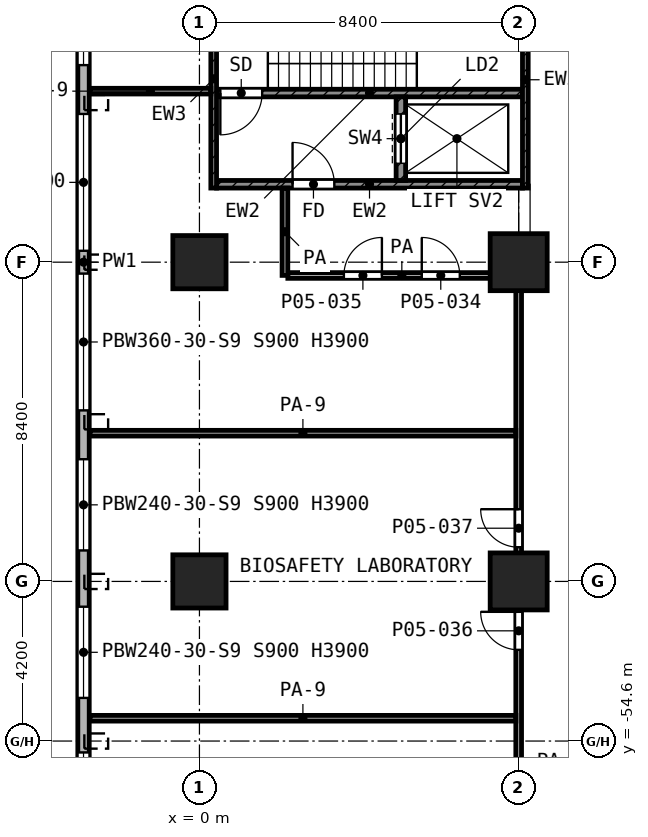
"""IFC4 building model, lengths in metres.
Left out: names, types, materials, properties, quantities, classifications, styles, units other than length and angle.
Written with IfcOpenShell. Run it as: python <this file> out.ifc"""

import sys

from ifc_helpers import new_model, si_unit, direction, frame, frame_2d, origin, origin_2d, place, context, subcontext, project, spatial, rectangle, extrude, element, fill, save


model = new_model("IFC4")
c1 = context("Model", 3, precision=1e-05, world=origin(), true_north=direction((0.0, 1.0)))
c2 = subcontext(c1, "Body", "Model", "MODEL_VIEW")
j1 = project(units=[si_unit("LENGTHUNIT", "METRE"), si_unit("PLANEANGLEUNIT", "RADIAN")], contexts=[c1])
p1 = place(None, origin())
s1 = spatial("IfcSite", under=j1, at=p1, CompositionType="ELEMENT")
p2 = place(p1, origin())
s2 = spatial("IfcBuilding", under=s1, at=p2, CompositionType="ELEMENT")
p3 = place(p2, frame((0.0, 0.0, 23.8)))
s3 = spatial("IfcBuildingStorey", under=s2, at=p3, CompositionType="ELEMENT", Elevation=23.8)
p4 = place(p3, frame((0.0, -42.0, 0.0), z_axis=(0.0, 0.0, 1.0), x_axis=(1.0, 0.0, 0.0)))
e1 = element("IfcColumn", 1, at=p4, inside=s3, PredefinedType="COLUMN", context=c2, shape_type="SweptSolid", body=[
    extrude(rectangle(XDim=1.4, YDim=1.4, at=origin_2d()), origin(), (0.0, 0.0, 1.0), 5.2),
])
p5 = place(p3, frame((8.4, -42.0, 0.0), z_axis=(0.0, 0.0, 1.0), x_axis=(1.0, 0.0, 0.0)))
e2 = element("IfcColumn", 2, at=p5, inside=s3, PredefinedType="COLUMN", context=c2, shape_type="SweptSolid", body=[
    extrude(rectangle(XDim=1.5, YDim=1.5, at=origin_2d()), origin(), (0.0, 0.0, 1.0), 5.2),
])
p6 = place(p3, frame((0.0, -50.4, 0.0), z_axis=(0.0, 0.0, 1.0), x_axis=(1.0, 0.0, 0.0)))
e3 = element("IfcColumn", 3, at=p6, inside=s3, PredefinedType="COLUMN", context=c2, shape_type="SweptSolid", body=[
    extrude(rectangle(XDim=1.4, YDim=1.4, at=origin_2d()), origin(), (0.0, 0.0, 1.0), 5.2),
])
p7 = place(p3, frame((8.4, -50.4, 0.0), z_axis=(0.0, 0.0, 1.0), x_axis=(1.0, 0.0, 0.0)))
e4 = element("IfcColumn", 4, at=p7, inside=s3, PredefinedType="COLUMN", context=c2, shape_type="SweptSolid", body=[
    extrude(rectangle(XDim=1.5, YDim=1.5, at=origin_2d()), origin(), (0.0, 0.0, 1.0), 5.2),
])
p8 = place(p3, frame((-3.05, -2.862, 0.0), z_axis=(0.0, 0.0, 1.0), x_axis=(0.0, -1.0, 0.0)))
e5 = element("IfcWall", 5, at=p8, inside=s3, PredefinedType="SOLIDWALL", context=c2, shape_type="SweptSolid", body=[
    extrude(rectangle(XDim=78.276, YDim=0.3, at=frame_2d((39.138, 0.0))), origin(), (0.0, 0.0, 1.0), 4.85),
])
p9 = place(p8, frame((1.638, 0.0, 0.9)))
e6 = element("IfcOpeningElement", 6, at=p9, cuts=e5, PredefinedType="OPENING", context=c2, shape_type="SweptSolid", body=[
    extrude(rectangle(XDim=3.6, YDim=3.0, at=frame_2d((1.8, 1.5))), frame((0.0, 0.16, 0.0), z_axis=(0.0, -1.0, 0.0), x_axis=(1.0, 0.0, 0.0)), (0.0, 0.0, 1.0), 0.32),
])
p10 = place(p8, frame((5.838, 0.0, 0.9)))
e7 = element("IfcOpeningElement", 7, at=p10, cuts=e5, PredefinedType="OPENING", context=c2, shape_type="SweptSolid", body=[
    extrude(rectangle(XDim=3.6, YDim=3.0, at=frame_2d((1.8, 1.5))), frame((0.0, 0.16, 0.0), z_axis=(0.0, -1.0, 0.0), x_axis=(1.0, 0.0, 0.0)), (0.0, 0.0, 1.0), 0.32),
])
p11 = place(p8, frame((10.038, 0.0, 0.9)))
e8 = element("IfcOpeningElement", 8, at=p11, cuts=e5, PredefinedType="OPENING", context=c2, shape_type="SweptSolid", body=[
    extrude(rectangle(XDim=3.6, YDim=3.0, at=frame_2d((1.8, 1.5))), frame((0.0, 0.16, 0.0), z_axis=(0.0, -1.0, 0.0), x_axis=(1.0, 0.0, 0.0)), (0.0, 0.0, 1.0), 0.32),
])
p12 = place(p8, frame((14.238, 0.0, 0.9)))
e9 = element("IfcOpeningElement", 9, at=p12, cuts=e5, PredefinedType="OPENING", context=c2, shape_type="SweptSolid", body=[
    extrude(rectangle(XDim=3.6, YDim=3.0, at=frame_2d((1.8, 1.5))), frame((0.0, 0.16, 0.0), z_axis=(0.0, -1.0, 0.0), x_axis=(1.0, 0.0, 0.0)), (0.0, 0.0, 1.0), 0.32),
])
p13 = place(p8, frame((18.438, 0.0, 0.9)))
e10 = element("IfcOpeningElement", 10, at=p13, cuts=e5, PredefinedType="OPENING", context=c2, shape_type="SweptSolid", body=[
    extrude(rectangle(XDim=3.6, YDim=3.0, at=frame_2d((1.8, 1.5))), frame((0.0, 0.16, 0.0), z_axis=(0.0, -1.0, 0.0), x_axis=(1.0, 0.0, 0.0)), (0.0, 0.0, 1.0), 0.32),
])
p14 = place(p8, frame((22.638, 0.0, 0.9)))
e11 = element("IfcOpeningElement", 11, at=p14, cuts=e5, PredefinedType="OPENING", context=c2, shape_type="SweptSolid", body=[
    extrude(rectangle(XDim=3.6, YDim=3.0, at=frame_2d((1.8, 1.5))), frame((0.0, 0.16, 0.0), z_axis=(0.0, -1.0, 0.0), x_axis=(1.0, 0.0, 0.0)), (0.0, 0.0, 1.0), 0.32),
])
p15 = place(p8, frame((27.653, 0.0, 0.9)))
e12 = element("IfcOpeningElement", 12, at=p15, cuts=e5, PredefinedType="OPENING", context=c2, shape_type="SweptSolid", body=[
    extrude(rectangle(XDim=2.4, YDim=3.0, at=frame_2d((1.2, 1.5))), frame((0.0, 0.16, 0.0), z_axis=(0.0, -1.0, 0.0), x_axis=(1.0, 0.0, 0.0)), (0.0, 0.0, 1.0), 0.32),
])
p16 = place(p8, frame((31.553, 0.0, 0.9)))
e13 = element("IfcOpeningElement", 13, at=p16, cuts=e5, PredefinedType="OPENING", context=c2, shape_type="SweptSolid", body=[
    extrude(rectangle(XDim=2.4, YDim=3.0, at=frame_2d((1.2, 1.5))), frame((0.0, 0.16, 0.0), z_axis=(0.0, -1.0, 0.0), x_axis=(1.0, 0.0, 0.0)), (0.0, 0.0, 1.0), 0.32),
])
p17 = place(p8, frame((35.238, 0.0, 0.9)))
e14 = element("IfcOpeningElement", 14, at=p17, cuts=e5, PredefinedType="OPENING", context=c2, shape_type="SweptSolid", body=[
    extrude(rectangle(XDim=3.6, YDim=3.0, at=frame_2d((1.8, 1.5))), frame((0.0, 0.16, 0.0), z_axis=(0.0, -1.0, 0.0), x_axis=(1.0, 0.0, 0.0)), (0.0, 0.0, 1.0), 0.32),
])
p18 = place(p8, frame((39.438, 0.0, 0.9)))
e15 = element("IfcOpeningElement", 15, at=p18, cuts=e5, PredefinedType="OPENING", context=c2, shape_type="SweptSolid", body=[
    extrude(rectangle(XDim=3.6, YDim=3.0, at=frame_2d((1.8, 1.5))), frame((0.0, 0.16, 0.0), z_axis=(0.0, -1.0, 0.0), x_axis=(1.0, 0.0, 0.0)), (0.0, 0.0, 1.0), 0.32),
])
p19 = place(p8, frame((44.323, 0.0, 0.9)))
e16 = element("IfcOpeningElement", 16, at=p19, cuts=e5, PredefinedType="OPENING", context=c2, shape_type="SweptSolid", body=[
    extrude(rectangle(XDim=2.4, YDim=3.0, at=frame_2d((1.2, 1.5))), frame((0.0, 0.16, 0.0), z_axis=(0.0, -1.0, 0.0), x_axis=(1.0, 0.0, 0.0)), (0.0, 0.0, 1.0), 0.32),
])
p20 = place(p8, frame((48.203, 0.0, 0.9)))
e17 = element("IfcOpeningElement", 17, at=p20, cuts=e5, PredefinedType="OPENING", context=c2, shape_type="SweptSolid", body=[
    extrude(rectangle(XDim=2.4, YDim=3.0, at=frame_2d((1.2, 1.5))), frame((0.0, 0.16, 0.0), z_axis=(0.0, -1.0, 0.0), x_axis=(1.0, 0.0, 0.0)), (0.0, 0.0, 1.0), 0.32),
])
p21 = place(p8, frame((52.038, 0.0, 0.9)))
e18 = element("IfcOpeningElement", 18, at=p21, cuts=e5, PredefinedType="OPENING", context=c2, shape_type="SweptSolid", body=[
    extrude(rectangle(XDim=3.6, YDim=3.0, at=frame_2d((1.8, 1.5))), frame((0.0, 0.16, 0.0), z_axis=(0.0, -1.0, 0.0), x_axis=(1.0, 0.0, 0.0)), (0.0, 0.0, 1.0), 0.32),
])
p22 = place(p8, frame((56.238, 0.0, 0.9)))
e19 = element("IfcOpeningElement", 19, at=p22, cuts=e5, PredefinedType="OPENING", context=c2, shape_type="SweptSolid", body=[
    extrude(rectangle(XDim=3.6, YDim=3.0, at=frame_2d((1.8, 1.5))), frame((0.0, 0.16, 0.0), z_axis=(0.0, -1.0, 0.0), x_axis=(1.0, 0.0, 0.0)), (0.0, 0.0, 1.0), 0.32),
])
p23 = place(p8, frame((60.438, 0.0, 0.9)))
e20 = element("IfcOpeningElement", 20, at=p23, cuts=e5, PredefinedType="OPENING", context=c2, shape_type="SweptSolid", body=[
    extrude(rectangle(XDim=3.6, YDim=3.0, at=frame_2d((1.8, 1.5))), frame((0.0, 0.16, 0.0), z_axis=(0.0, -1.0, 0.0), x_axis=(1.0, 0.0, 0.0)), (0.0, 0.0, 1.0), 0.32),
])
p24 = place(p8, frame((64.638, 0.0, 0.9)))
e21 = element("IfcOpeningElement", 21, at=p24, cuts=e5, PredefinedType="OPENING", context=c2, shape_type="SweptSolid", body=[
    extrude(rectangle(XDim=3.6, YDim=3.0, at=frame_2d((1.8, 1.5))), frame((0.0, 0.16, 0.0), z_axis=(0.0, -1.0, 0.0), x_axis=(1.0, 0.0, 0.0)), (0.0, 0.0, 1.0), 0.32),
])
p25 = place(p8, frame((69.238, 0.0, 0.9)))
e22 = element("IfcOpeningElement", 22, at=p25, cuts=e5, PredefinedType="OPENING", context=c2, shape_type="SweptSolid", body=[
    extrude(rectangle(XDim=1.2, YDim=3.0, at=frame_2d((0.6, 1.5))), frame((0.0, 0.16, 0.0), z_axis=(0.0, -1.0, 0.0), x_axis=(1.0, 0.0, 0.0)), (0.0, 0.0, 1.0), 0.32),
])
p26 = place(p8, frame((73.038, 0.0, 0.9)))
e23 = element("IfcOpeningElement", 23, at=p26, cuts=e5, PredefinedType="OPENING", context=c2, shape_type="SweptSolid", body=[
    extrude(rectangle(XDim=3.6, YDim=3.0, at=frame_2d((1.8, 1.5))), frame((0.0, 0.16, 0.0), z_axis=(0.0, -1.0, 0.0), x_axis=(1.0, 0.0, 0.0)), (0.0, 0.0, 1.0), 0.32),
])
p27 = place(p3, frame((0.375, -40.05, 0.0), z_axis=(0.0, 0.0, 1.0), x_axis=(0.0, 1.0, 0.0)))
e24 = element("IfcWall", 24, at=p27, inside=s3, PredefinedType="SHEAR", context=c2, shape_type="SweptSolid", body=[
    extrude(rectangle(XDim=5.75, YDim=0.15, at=frame_2d((2.875, 0.0))), origin(), (0.0, 0.0, 1.0), 4.85),
])
p28 = place(p3, frame((8.575, -40.05, 0.0), z_axis=(0.0, 0.0, 1.0), x_axis=(0.0, 1.0, 0.0)))
e25 = element("IfcWall", 25, at=p28, inside=s3, PredefinedType="SHEAR", context=c2, shape_type="SweptSolid", body=[
    extrude(rectangle(XDim=5.7, YDim=0.15, at=frame_2d((2.85, 0.0))), origin(), (0.0, 0.0, 1.0), 4.85),
])
p29 = place(p3, frame((0.45, -37.55, 0.0), z_axis=(0.0, 0.0, 1.0), x_axis=(1.0, 0.0, 0.0)))
e26 = element("IfcWall", 26, at=p29, inside=s3, PredefinedType="SHEAR", context=c2, shape_type="SweptSolid", body=[
    extrude(rectangle(XDim=8.05, YDim=0.2, at=frame_2d((4.025, 0.0))), origin(), (0.0, 0.0, 1.0), 4.85),
])
p30 = place(p29, frame((0.1, 0.0, 0.0)))
e27 = element("IfcOpeningElement", 27, at=p30, cuts=e26, PredefinedType="OPENING", context=c2, shape_type="SweptSolid", body=[
    extrude(rectangle(XDim=1.1, YDim=2.1, at=frame_2d((0.55, 1.05))), frame((0.0, 0.11, 0.0), z_axis=(0.0, -1.0, 0.0), x_axis=(1.0, 0.0, 0.0)), (0.0, 0.0, 1.0), 0.22),
])
p31 = place(p3, frame((0.45, -39.95, 0.0), z_axis=(0.0, 0.0, 1.0), x_axis=(1.0, 0.0, 0.0)))
e28 = element("IfcWall", 28, at=p31, inside=s3, PredefinedType="SHEAR", context=c2, shape_type="SweptSolid", body=[
    extrude(rectangle(XDim=8.05, YDim=0.2, at=frame_2d((4.025, 0.0))), origin(), (0.0, 0.0, 1.0), 4.85),
])
p32 = place(p31, frame((2.0, 0.0, 0.0)))
e29 = element("IfcOpeningElement", 29, at=p32, cuts=e28, PredefinedType="OPENING", context=c2, shape_type="SweptSolid", body=[
    extrude(rectangle(XDim=1.1, YDim=2.1, at=frame_2d((0.55, 1.05))), frame((0.0, 0.11, 0.0), z_axis=(0.0, -1.0, 0.0), x_axis=(1.0, 0.0, 0.0)), (0.0, 0.0, 1.0), 0.22),
])
p33 = place(p3, frame((5.3, -39.85, 0.0), z_axis=(0.0, 0.0, 1.0), x_axis=(0.0, 1.0, 0.0)))
e30 = element("IfcWall", 30, at=p33, inside=s3, PredefinedType="SHEAR", context=c2, shape_type="SweptSolid", body=[
    extrude(rectangle(XDim=2.2, YDim=0.25, at=frame_2d((1.1, 0.0))), origin(), (0.0, 0.0, 1.0), 4.85),
])
p34 = place(p33, frame((0.45, 0.0, 0.0)))
e31 = element("IfcOpeningElement", 31, at=p34, cuts=e30, PredefinedType="OPENING", context=c2, shape_type="SweptSolid", body=[
    extrude(rectangle(XDim=1.3, YDim=2.1, at=frame_2d((0.65, 1.05))), frame((0.0, 0.135, 0.0), z_axis=(0.0, -1.0, 0.0), x_axis=(1.0, 0.0, 0.0)), (0.0, 0.0, 1.0), 0.27),
])
for number, where, z_axis, x_axis in (
    (32, (-2.88, -54.0, 0.0), (0.0, 0.0, 1.0), (1.0, 0.0, 0.0)),
    (33, (-2.88, -46.5, 0.0), (0.0, 0.0, 1.0), (1.0, 0.0, 0.0)),
):
    element("IfcWall", number, at=place(p3, frame(where, z_axis=z_axis, x_axis=x_axis)), inside=s3, PredefinedType="PARTITIONING", context=c2, shape_type="SweptSolid", body=[
        extrude(rectangle(XDim=11.205, YDim=0.15, at=frame_2d((5.603, 0.0))), origin(), (0.0, 0.0, 1.0), 3.45),
    ])
p35 = place(p3, frame((2.326, -42.35, 0.0), z_axis=(0.0, 0.0, 1.0), x_axis=(1.0, 0.0, 0.0)))
e34 = element("IfcWall", 34, at=p35, inside=s3, PredefinedType="PARTITIONING", context=c2, shape_type="SweptSolid", body=[
    extrude(rectangle(XDim=5.999, YDim=0.15, at=frame_2d((3.0, 0.0))), origin(), (0.0, 0.0, 1.0), 4.85),
])
p36 = place(p35, frame((3.524, 0.0, 0.0)))
e35 = element("IfcOpeningElement", 35, at=p36, cuts=e34, PredefinedType="OPENING", context=c2, shape_type="SweptSolid", body=[
    extrude(rectangle(XDim=1.0, YDim=2.1, at=frame_2d((0.5, 1.05))), frame((0.0, 0.085, 0.0), z_axis=(0.0, -1.0, 0.0), x_axis=(1.0, 0.0, 0.0)), (0.0, 0.0, 1.0), 0.17),
])
p37 = place(p35, frame((1.475, 0.0, 0.0)))
e36 = element("IfcOpeningElement", 36, at=p37, cuts=e34, PredefinedType="OPENING", context=c2, shape_type="SweptSolid", body=[
    extrude(rectangle(XDim=1.0, YDim=2.1, at=frame_2d((0.5, 1.05))), frame((0.0, 0.085, 0.0), z_axis=(0.0, -1.0, 0.0), x_axis=(1.0, 0.0, 0.0)), (0.0, 0.0, 1.0), 0.17),
])
p38 = place(p3, frame((-2.88, -37.5, 0.0), z_axis=(0.0, 0.0, 1.0), x_axis=(1.0, 0.0, 0.0)))
e37 = element("IfcWall", 37, at=p38, inside=s3, PredefinedType="PARTITIONING", context=c2, shape_type="SweptSolid", body=[
    extrude(rectangle(XDim=3.18, YDim=0.15, at=frame_2d((1.59, 0.0))), origin(), (0.0, 0.0, 1.0), 3.45),
])
p39 = place(p3, frame((2.25, -42.348, 0.0), z_axis=(0.0, 0.0, 1.0), x_axis=(0.0, 1.0, 0.0)))
e38 = element("IfcWall", 38, at=p39, inside=s3, PredefinedType="PARTITIONING", context=c2, shape_type="SweptSolid", body=[
    extrude(rectangle(XDim=2.298, YDim=0.15, at=frame_2d((1.149, 0.0))), origin(), (0.0, 0.0, 1.0), 4.85),
])
p40 = place(p3, frame((8.4, -67.947, 0.0), z_axis=(0.0, 0.0, 1.0), x_axis=(0.0, 1.0, 0.0)))
e39 = element("IfcWall", 39, at=p40, inside=s3, PredefinedType="PARTITIONING", context=c2, shape_type="SweptSolid", body=[
    extrude(rectangle(XDim=25.597, YDim=0.15, at=frame_2d((12.798, 0.0))), origin(), (0.0, 0.0, 1.0), 4.85),
])
p41 = place(p40, frame((15.747, 0.0, 0.0)))
e40 = element("IfcOpeningElement", 40, at=p41, cuts=e39, PredefinedType="OPENING", context=c2, shape_type="SweptSolid", body=[
    extrude(rectangle(XDim=1.0, YDim=2.1, at=frame_2d((0.5, 1.05))), frame((0.0, 0.085, 0.0), z_axis=(0.0, -1.0, 0.0), x_axis=(1.0, 0.0, 0.0)), (0.0, 0.0, 1.0), 0.17),
])
p42 = place(p40, frame((18.447, 0.0, 0.0)))
e41 = element("IfcOpeningElement", 41, at=p42, cuts=e39, PredefinedType="OPENING", context=c2, shape_type="SweptSolid", body=[
    extrude(rectangle(XDim=1.0, YDim=2.1, at=frame_2d((0.5, 1.05))), frame((0.0, 0.085, 0.0), z_axis=(0.0, -1.0, 0.0), x_axis=(1.0, 0.0, 0.0)), (0.0, 0.0, 1.0), 0.17),
])
p43 = place(p40, frame((7.347, 0.0, 0.0)))
e42 = element("IfcOpeningElement", 42, at=p43, cuts=e39, PredefinedType="OPENING", context=c2, shape_type="SweptSolid", body=[
    extrude(rectangle(XDim=1.0, YDim=2.1, at=frame_2d((0.5, 1.05))), frame((0.0, 0.085, 0.0), z_axis=(0.0, -1.0, 0.0), x_axis=(1.0, 0.0, 0.0)), (0.0, 0.0, 1.0), 0.17),
])
p44 = place(p40, frame((10.447, 0.0, 0.0)))
e43 = element("IfcOpeningElement", 43, at=p44, cuts=e39, PredefinedType="OPENING", context=c2, shape_type="SweptSolid", body=[
    extrude(rectangle(XDim=1.0, YDim=2.1, at=frame_2d((0.5, 1.05))), frame((0.0, 0.085, 0.0), z_axis=(0.0, -1.0, 0.0), x_axis=(1.0, 0.0, 0.0)), (0.0, 0.0, 1.0), 0.17),
])
p45 = place(p40, frame((1.549, 0.0, 0.0)))
e44 = element("IfcOpeningElement", 44, at=p45, cuts=e39, PredefinedType="OPENING", context=c2, shape_type="SweptSolid", body=[
    extrude(rectangle(XDim=1.0, YDim=2.1, at=frame_2d((0.5, 1.05))), frame((0.0, 0.085, 0.0), z_axis=(0.0, -1.0, 0.0), x_axis=(1.0, 0.0, 0.0)), (0.0, 0.0, 1.0), 0.17),
])
p46 = place(p40, frame((2.898, 0.0, 0.0)))
e45 = element("IfcOpeningElement", 45, at=p46, cuts=e39, PredefinedType="OPENING", context=c2, shape_type="SweptSolid", body=[
    extrude(rectangle(XDim=1.0, YDim=2.1, at=frame_2d((0.5, 1.05))), frame((0.0, 0.085, 0.0), z_axis=(0.0, -1.0, 0.0), x_axis=(1.0, 0.0, 0.0)), (0.0, 0.0, 1.0), 0.17),
])
p47 = place(p16, origin())
e46 = element("IfcWindow", 46, at=p47, inside=s3, PartitioningType="SINGLE_PANEL", PredefinedType="WINDOW", context=c2, shape_type="SweptSolid", body=[
    extrude(rectangle(XDim=2.4, YDim=3.0, at=frame_2d((1.2, 1.5))), frame((0.0, 0.03, 0.0), z_axis=(0.0, -1.0, 0.0), x_axis=(1.0, 0.0, 0.0)), (0.0, 0.0, 1.0), 0.06),
])
fill(e13, e46)
p48 = place(p17, origin())
e47 = element("IfcWindow", 47, at=p48, inside=s3, PartitioningType="SINGLE_PANEL", PredefinedType="WINDOW", context=c2, shape_type="SweptSolid", body=[
    extrude(rectangle(XDim=3.6, YDim=3.0, at=frame_2d((1.8, 1.5))), frame((0.0, 0.03, 0.0), z_axis=(0.0, -1.0, 0.0), x_axis=(1.0, 0.0, 0.0)), (0.0, 0.0, 1.0), 0.06),
])
fill(e14, e47)
p49 = place(p18, origin())
e48 = element("IfcWindow", 48, at=p49, inside=s3, PartitioningType="SINGLE_PANEL", PredefinedType="WINDOW", context=c2, shape_type="SweptSolid", body=[
    extrude(rectangle(XDim=3.6, YDim=3.0, at=frame_2d((1.8, 1.5))), frame((0.0, 0.03, 0.0), z_axis=(0.0, -1.0, 0.0), x_axis=(1.0, 0.0, 0.0)), (0.0, 0.0, 1.0), 0.06),
])
fill(e15, e48)
p50 = place(p19, origin())
e49 = element("IfcWindow", 49, at=p50, inside=s3, PartitioningType="SINGLE_PANEL", PredefinedType="WINDOW", context=c2, shape_type="SweptSolid", body=[
    extrude(rectangle(XDim=2.4, YDim=3.0, at=frame_2d((1.2, 1.5))), frame((0.0, 0.03, 0.0), z_axis=(0.0, -1.0, 0.0), x_axis=(1.0, 0.0, 0.0)), (0.0, 0.0, 1.0), 0.06),
])
fill(e16, e49)
p51 = place(p20, origin())
e50 = element("IfcWindow", 50, at=p51, inside=s3, PartitioningType="SINGLE_PANEL", PredefinedType="WINDOW", context=c2, shape_type="SweptSolid", body=[
    extrude(rectangle(XDim=2.4, YDim=3.0, at=frame_2d((1.2, 1.5))), frame((0.0, 0.03, 0.0), z_axis=(0.0, -1.0, 0.0), x_axis=(1.0, 0.0, 0.0)), (0.0, 0.0, 1.0), 0.06),
])
fill(e17, e50)
p52 = place(p21, origin())
e51 = element("IfcWindow", 51, at=p52, inside=s3, PartitioningType="SINGLE_PANEL", PredefinedType="WINDOW", context=c2, shape_type="SweptSolid", body=[
    extrude(rectangle(XDim=3.6, YDim=3.0, at=frame_2d((1.8, 1.5))), frame((0.0, 0.03, 0.0), z_axis=(0.0, -1.0, 0.0), x_axis=(1.0, 0.0, 0.0)), (0.0, 0.0, 1.0), 0.06),
])
fill(e18, e51)
p53 = place(p30, frame((1.1, 0.0, 0.0), z_axis=(0.0, 0.0, 1.0), x_axis=(-1.0, 0.0, 0.0)))
e52 = element("IfcDoor", 52, at=p53, inside=s3, OperationType="SINGLE_SWING_LEFT", PredefinedType="DOOR", context=c2, shape_type="SweptSolid", body=[
    extrude(rectangle(XDim=1.1, YDim=2.1, at=frame_2d((0.55, 1.05))), frame((0.0, 0.025, 0.0), z_axis=(0.0, -1.0, 0.0), x_axis=(1.0, 0.0, 0.0)), (0.0, 0.0, 1.0), 0.05),
])
fill(e27, e52)
p54 = place(p34, origin())
e53 = element("IfcDoor", 53, at=p54, inside=s3, OperationType="DOUBLE_DOOR_SLIDING", PredefinedType="DOOR", context=c2, shape_type="SweptSolid", body=[
    extrude(rectangle(XDim=1.3, YDim=2.1, at=frame_2d((0.65, 1.05))), frame((0.0, 0.025, 0.0), z_axis=(0.0, -1.0, 0.0), x_axis=(1.0, 0.0, 0.0)), (0.0, 0.0, 1.0), 0.05),
])
fill(e31, e53)
p55 = place(p32, origin())
e54 = element("IfcDoor", 54, at=p55, inside=s3, OperationType="SINGLE_SWING_LEFT", PredefinedType="DOOR", context=c2, shape_type="SweptSolid", body=[
    extrude(rectangle(XDim=1.1, YDim=2.1, at=frame_2d((0.55, 1.05))), frame((0.0, 0.025, 0.0), z_axis=(0.0, -1.0, 0.0), x_axis=(1.0, 0.0, 0.0)), (0.0, 0.0, 1.0), 0.05),
])
fill(e29, e54)
p56 = place(p36, origin())
e55 = element("IfcDoor", 55, at=p56, inside=s3, OperationType="SINGLE_SWING_LEFT", PredefinedType="DOOR", context=c2, shape_type="SweptSolid", body=[
    extrude(rectangle(XDim=1.0, YDim=2.1, at=frame_2d((0.5, 1.05))), frame((0.0, 0.025, 0.0), z_axis=(0.0, -1.0, 0.0), x_axis=(1.0, 0.0, 0.0)), (0.0, 0.0, 1.0), 0.05),
])
fill(e35, e55)
p57 = place(p37, origin())
e56 = element("IfcDoor", 56, at=p57, inside=s3, OperationType="SINGLE_SWING_RIGHT", PredefinedType="DOOR", context=c2, shape_type="SweptSolid", body=[
    extrude(rectangle(XDim=1.0, YDim=2.1, at=frame_2d((0.5, 1.05))), frame((0.0, 0.025, 0.0), z_axis=(0.0, -1.0, 0.0), x_axis=(1.0, 0.0, 0.0)), (0.0, 0.0, 1.0), 0.05),
])
fill(e36, e56)
p58 = place(p41, origin())
e57 = element("IfcDoor", 57, at=p58, inside=s3, OperationType="SINGLE_SWING_RIGHT", PredefinedType="DOOR", context=c2, shape_type="SweptSolid", body=[
    extrude(rectangle(XDim=1.0, YDim=2.1, at=frame_2d((0.5, 1.05))), frame((0.0, 0.025, 0.0), z_axis=(0.0, -1.0, 0.0), x_axis=(1.0, 0.0, 0.0)), (0.0, 0.0, 1.0), 0.05),
])
fill(e40, e57)
p59 = place(p42, origin())
e58 = element("IfcDoor", 58, at=p59, inside=s3, OperationType="SINGLE_SWING_RIGHT", PredefinedType="DOOR", context=c2, shape_type="SweptSolid", body=[
    extrude(rectangle(XDim=1.0, YDim=2.1, at=frame_2d((0.5, 1.05))), frame((0.0, 0.025, 0.0), z_axis=(0.0, -1.0, 0.0), x_axis=(1.0, 0.0, 0.0)), (0.0, 0.0, 1.0), 0.05),
])
fill(e41, e58)
save(model, sys.argv[1])
